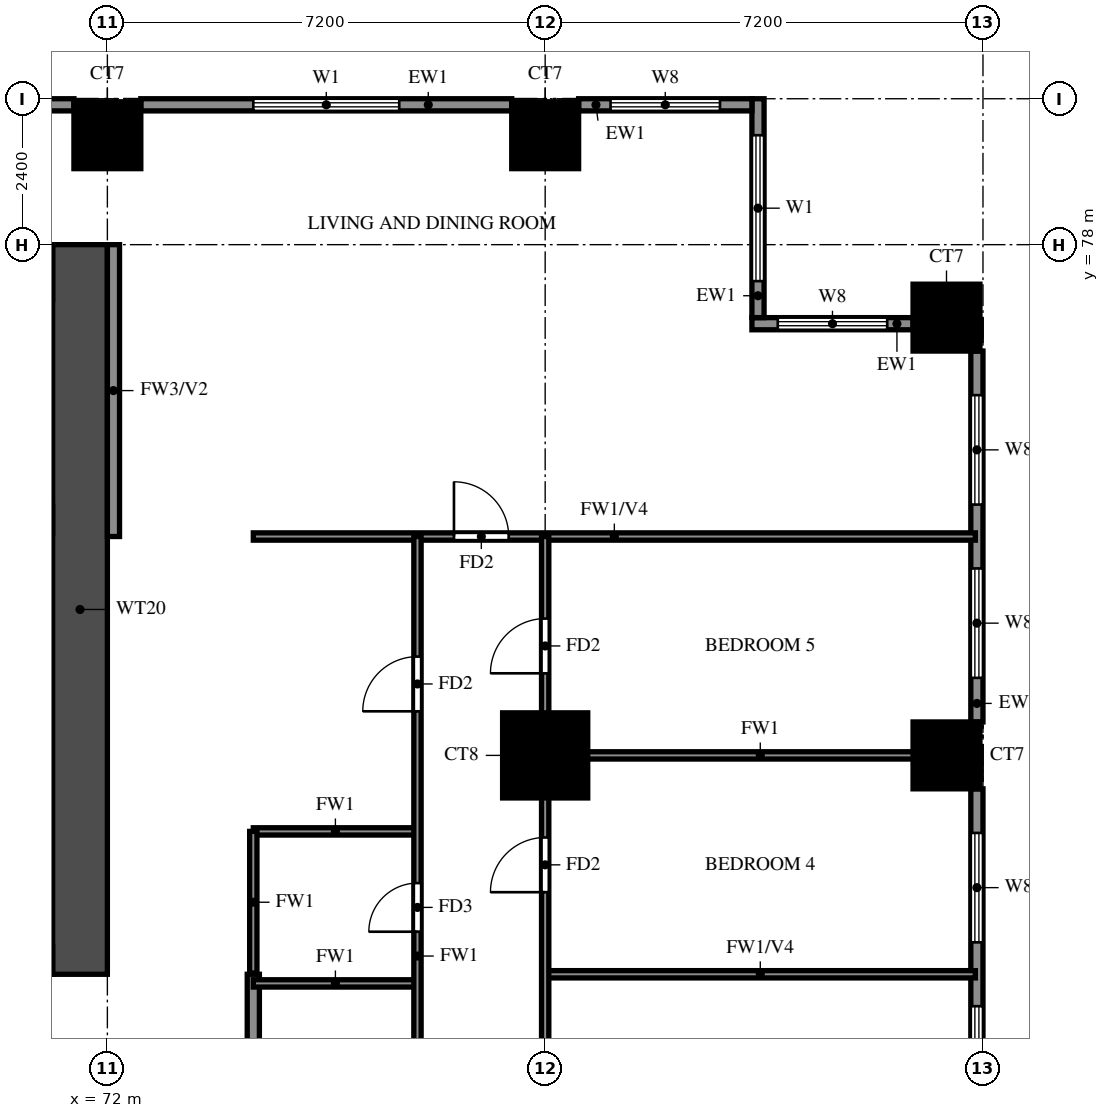
"""IFC4 building model, lengths in metres.
Left out: names, types, materials, properties, quantities, classifications, styles, units other than length and angle.
Written with IfcOpenShell. Run it as: python <this file> out.ifc"""

import sys

from ifc_helpers import new_model, si_unit, direction, frame, frame_2d, origin, origin_2d, place, context, subcontext, project, spatial, rectangle, extrude, source, transform, mapped, element, fill, save


model = new_model("IFC4")
c1 = context("Model", 3, precision=1e-05, world=origin(), true_north=direction((0.0, 1.0)))
c2 = subcontext(c1, "Body", "Model", "MODEL_VIEW")
j1 = project(units=[si_unit("LENGTHUNIT", "METRE"), si_unit("PLANEANGLEUNIT", "RADIAN")], contexts=[c1])
p1 = place(None, origin())
s1 = spatial("IfcSite", under=j1, at=p1, CompositionType="ELEMENT")
p2 = place(p1, origin())
s2 = spatial("IfcBuilding", under=s1, at=p2, CompositionType="ELEMENT")
p3 = place(p2, frame((0.0, 0.0, 30.5)))
s3 = spatial("IfcBuildingStorey", under=s2, at=p3, CompositionType="ELEMENT", Elevation=30.5)
m1 = source(origin(), c2, "Body", "SweptSolid", [
    extrude(rectangle(XDim=1.4, YDim=1.4, at=origin_2d()), origin(), (0.0, 0.0, 1.0), 3.18),
])
p4 = place(p3, frame((79.2, 69.6, 0.0), z_axis=(0.0, 0.0, 1.0), x_axis=(1.0, 0.0, 0.0)))
e1 = element("IfcColumn", 1, at=p4, inside=s3, PredefinedType="COLUMN", context=c2, shape_type="MappedRepresentation", body=[
    mapped(m1, transform((0.0, 0.0, 0.0))),
])
m2 = source(origin(), c2, "Body", "SweptSolid", [
    extrude(rectangle(XDim=1.1, YDim=1.1, at=origin_2d()), origin(), (0.0, 0.0, 1.0), 3.18),
])
for number, where, z_axis, x_axis in (
    (2, (85.8, 69.6, 0.0), (0.0, 0.0, 1.0), (1.0, 0.0, 0.0)),
    (3, (85.8, 76.8, 0.0), (0.0, 0.0, 1.0), (1.0, 0.0, 0.0)),
    (4, (72.0, 79.8, 0.0), (0.0, 0.0, 1.0), (1.0, 0.0, 0.0)),
    (5, (79.2, 79.8, 0.0), (0.0, 0.0, 1.0), (1.0, 0.0, 0.0)),
):
    element("IfcColumn", number, at=place(p3, frame(where, z_axis=z_axis, x_axis=x_axis)), inside=s3, PredefinedType="COLUMN", context=c2, shape_type="MappedRepresentation", body=[
        mapped(m2, transform((0.0, 0.0, 0.0))),
    ])
p5 = place(p3, frame((71.55, 66.0, 0.0), z_axis=(0.0, 0.0, 1.0), x_axis=(0.0, 1.0, 0.0)))
e6 = element("IfcWall", 6, at=p5, inside=s3, PredefinedType="SHEAR", context=c2, shape_type="SweptSolid", body=[
    extrude(rectangle(XDim=12.0, YDim=0.9, at=frame_2d((6.0, 0.0))), origin(), (0.0, 0.0, 1.0), 3.18),
])
p6 = place(p3, frame((29.7, 77.55, 0.0), z_axis=(0.0, 0.0, 1.0), x_axis=(1.0, 0.0, 0.0)))
e7 = element("IfcWall", 7, at=p6, inside=s3, PredefinedType="SHEAR", context=c2, shape_type="SweptSolid", body=[
    extrude(rectangle(XDim=41.4, YDim=0.9, at=frame_2d((20.7, 0.0))), origin(), (0.0, 0.0, 1.0), 3.18),
])
p7 = place(p3, frame((29.7, 66.225, 0.0), z_axis=(0.0, 0.0, 1.0), x_axis=(1.0, 0.0, 0.0)))
e8 = element("IfcWall", 8, at=p7, inside=s3, PredefinedType="SHEAR", context=c2, shape_type="SweptSolid", body=[
    extrude(rectangle(XDim=41.4, YDim=0.45, at=frame_2d((20.7, 0.0))), origin(), (0.0, 0.0, 1.0), 3.18),
])
p8 = place(p7, frame((0.925, 0.0, 0.0)))
e9 = element("IfcOpeningElement", 9, at=p8, cuts=e8, PredefinedType="OPENING", context=c2, shape_type="SweptSolid", body=[
    extrude(rectangle(XDim=1.1, YDim=2.1, at=frame_2d((0.55, 1.05))), frame((0.0, 0.235, 0.0), z_axis=(0.0, -1.0, 0.0), x_axis=(1.0, 0.0, 0.0)), (0.0, 0.0, 1.0), 0.47),
])
p9 = place(p7, frame((3.738, 0.0, 0.0)))
e10 = element("IfcOpeningElement", 10, at=p9, cuts=e8, PredefinedType="OPENING", context=c2, shape_type="SweptSolid", body=[
    extrude(rectangle(XDim=1.8, YDim=2.1, at=frame_2d((0.9, 1.05))), frame((0.0, 0.235, 0.0), z_axis=(0.0, -1.0, 0.0), x_axis=(1.0, 0.0, 0.0)), (0.0, 0.0, 1.0), 0.47),
])
p10 = place(p3, frame((86.3, 62.95, 0.0), z_axis=(0.0, 0.0, 1.0), x_axis=(0.0, 1.0, 0.0)))
e11 = element("IfcWall", 11, at=p10, inside=s3, PredefinedType="SOLIDWALL", context=c2, shape_type="SweptSolid", body=[
    extrude(rectangle(XDim=6.1, YDim=0.2, at=frame_2d((3.05, 0.0))), origin(), (0.0, 0.0, 1.0), 3.18),
])
p11 = place(p10, frame((0.725, 0.0, 0.6)))
e12 = element("IfcOpeningElement", 12, at=p11, cuts=e11, PredefinedType="OPENING", context=c2, shape_type="SweptSolid", body=[
    extrude(rectangle(XDim=1.8, YDim=2.4, at=frame_2d((0.9, 1.2))), frame((0.0, 0.11, 0.0), z_axis=(0.0, -1.0, 0.0), x_axis=(1.0, 0.0, 0.0)), (0.0, 0.0, 1.0), 0.22),
])
p12 = place(p10, frame((3.575, 0.0, 0.6)))
e13 = element("IfcOpeningElement", 13, at=p12, cuts=e11, PredefinedType="OPENING", context=c2, shape_type="SweptSolid", body=[
    extrude(rectangle(XDim=1.8, YDim=2.4, at=frame_2d((0.9, 1.2))), frame((0.0, 0.11, 0.0), z_axis=(0.0, -1.0, 0.0), x_axis=(1.0, 0.0, 0.0)), (0.0, 0.0, 1.0), 0.22),
])
p13 = place(p3, frame((86.3, 70.15, 0.0), z_axis=(0.0, 0.0, 1.0), x_axis=(0.0, 1.0, 0.0)))
e14 = element("IfcWall", 14, at=p13, inside=s3, PredefinedType="SOLIDWALL", context=c2, shape_type="SweptSolid", body=[
    extrude(rectangle(XDim=6.1, YDim=0.2, at=frame_2d((3.05, 0.0))), origin(), (0.0, 0.0, 1.0), 3.18),
])
p14 = place(p13, frame((0.725, 0.0, 0.6)))
e15 = element("IfcOpeningElement", 15, at=p14, cuts=e14, PredefinedType="OPENING", context=c2, shape_type="SweptSolid", body=[
    extrude(rectangle(XDim=1.8, YDim=2.4, at=frame_2d((0.9, 1.2))), frame((0.0, 0.11, 0.0), z_axis=(0.0, -1.0, 0.0), x_axis=(1.0, 0.0, 0.0)), (0.0, 0.0, 1.0), 0.22),
])
p15 = place(p13, frame((3.575, 0.0, 0.6)))
e16 = element("IfcOpeningElement", 16, at=p15, cuts=e14, PredefinedType="OPENING", context=c2, shape_type="SweptSolid", body=[
    extrude(rectangle(XDim=1.8, YDim=2.4, at=frame_2d((0.9, 1.2))), frame((0.0, 0.11, 0.0), z_axis=(0.0, -1.0, 0.0), x_axis=(1.0, 0.0, 0.0)), (0.0, 0.0, 1.0), 0.22),
])
p16 = place(p3, frame((85.25, 76.7, 0.0), z_axis=(0.0, 0.0, 1.0), x_axis=(-1.0, 0.0, 0.0)))
e17 = element("IfcWall", 17, at=p16, inside=s3, PredefinedType="SOLIDWALL", context=c2, shape_type="SweptSolid", body=[
    extrude(rectangle(XDim=2.65, YDim=0.2, at=frame_2d((1.325, 0.0))), origin(), (0.0, 0.0, 1.0), 3.18),
])
p17 = place(p16, frame((0.425, 0.0, 0.6)))
e18 = element("IfcOpeningElement", 18, at=p17, cuts=e17, PredefinedType="OPENING", context=c2, shape_type="SweptSolid", body=[
    extrude(rectangle(XDim=1.8, YDim=2.4, at=frame_2d((0.9, 1.2))), frame((0.0, 0.11, 0.0), z_axis=(0.0, -1.0, 0.0), x_axis=(1.0, 0.0, 0.0)), (0.0, 0.0, 1.0), 0.22),
])
p18 = place(p3, frame((82.7, 76.8, 0.0), z_axis=(0.0, 0.0, 1.0), x_axis=(0.0, 1.0, 0.0)))
e19 = element("IfcWall", 19, at=p18, inside=s3, PredefinedType="SOLIDWALL", context=c2, shape_type="SweptSolid", body=[
    extrude(rectangle(XDim=3.6, YDim=0.2, at=frame_2d((1.8, 0.0))), origin(), (0.0, 0.0, 1.0), 3.18),
])
p19 = place(p18, frame((0.6, 0.0, 0.6)))
e20 = element("IfcOpeningElement", 20, at=p19, cuts=e19, PredefinedType="OPENING", context=c2, shape_type="SweptSolid", body=[
    extrude(rectangle(XDim=2.4, YDim=2.4, at=frame_2d((1.2, 1.2))), frame((0.0, 0.11, 0.0), z_axis=(0.0, -1.0, 0.0), x_axis=(1.0, 0.0, 0.0)), (0.0, 0.0, 1.0), 0.22),
])
p20 = place(p3, frame((82.6, 80.3, 0.0), z_axis=(0.0, 0.0, 1.0), x_axis=(-1.0, 0.0, 0.0)))
e21 = element("IfcWall", 21, at=p20, inside=s3, PredefinedType="SOLIDWALL", context=c2, shape_type="SweptSolid", body=[
    extrude(rectangle(XDim=2.85, YDim=0.2, at=frame_2d((1.425, 0.0))), origin(), (0.0, 0.0, 1.0), 3.18),
])
p21 = place(p20, frame((0.525, 0.0, 0.6)))
e22 = element("IfcOpeningElement", 22, at=p21, cuts=e21, PredefinedType="OPENING", context=c2, shape_type="SweptSolid", body=[
    extrude(rectangle(XDim=1.8, YDim=2.4, at=frame_2d((0.9, 1.2))), frame((0.0, 0.11, 0.0), z_axis=(0.0, -1.0, 0.0), x_axis=(1.0, 0.0, 0.0)), (0.0, 0.0, 1.0), 0.22),
])
p22 = place(p3, frame((78.65, 80.3, 0.0), z_axis=(0.0, 0.0, 1.0), x_axis=(-1.0, 0.0, 0.0)))
e23 = element("IfcWall", 23, at=p22, inside=s3, PredefinedType="SOLIDWALL", context=c2, shape_type="SweptSolid", body=[
    extrude(rectangle(XDim=6.1, YDim=0.2, at=frame_2d((3.05, 0.0))), origin(), (0.0, 0.0, 1.0), 3.18),
])
p23 = place(p22, frame((1.85, 0.0, 0.6)))
e24 = element("IfcOpeningElement", 24, at=p23, cuts=e23, PredefinedType="OPENING", context=c2, shape_type="SweptSolid", body=[
    extrude(rectangle(XDim=2.4, YDim=2.4, at=frame_2d((1.2, 1.2))), frame((0.0, 0.11, 0.0), z_axis=(0.0, -1.0, 0.0), x_axis=(1.0, 0.0, 0.0)), (0.0, 0.0, 1.0), 0.22),
])
p24 = place(p3, frame((71.45, 80.3, 0.0), z_axis=(0.0, 0.0, 1.0), x_axis=(-1.0, 0.0, 0.0)))
e25 = element("IfcWall", 25, at=p24, inside=s3, PredefinedType="SOLIDWALL", context=c2, shape_type="SweptSolid", body=[
    extrude(rectangle(XDim=6.1, YDim=0.2, at=frame_2d((3.05, 0.0))), origin(), (0.0, 0.0, 1.0), 3.18),
])
p25 = place(p3, frame((72.1, 73.2, 0.0), z_axis=(0.0, 0.0, 1.0), x_axis=(0.0, 1.0, 0.0)))
e26 = element("IfcWall", 26, at=p25, inside=s3, PredefinedType="SOLIDWALL", context=c2, shape_type="SweptSolid", body=[
    extrude(rectangle(XDim=4.8, YDim=0.2, at=frame_2d((2.4, 0.0))), origin(), (0.0, 0.0, 1.0), 3.18),
])
p26 = place(p3, frame((74.4, 56.4, 0.0), z_axis=(0.0, 0.0, 1.0), x_axis=(0.0, 1.0, 0.0)))
e27 = element("IfcWall", 27, at=p26, inside=s3, PredefinedType="SOLIDWALL", context=c2, shape_type="SweptSolid", body=[
    extrude(rectangle(XDim=9.6, YDim=0.2, at=frame_2d((4.8, 0.0))), origin(), (0.0, 0.0, 1.0), 3.18),
])
p27 = place(p26, frame((0.7, 0.0, 0.0)))
e28 = element("IfcOpeningElement", 28, at=p27, cuts=e27, PredefinedType="OPENING", context=c2, shape_type="SweptSolid", body=[
    extrude(rectangle(XDim=1.0, YDim=2.1, at=frame_2d((0.5, 1.05))), frame((0.0, 0.11, 0.0), z_axis=(0.0, -1.0, 0.0), x_axis=(1.0, 0.0, 0.0)), (0.0, 0.0, 1.0), 0.22),
])
p28 = place(p26, frame((3.1, 0.0, 0.0)))
e29 = element("IfcOpeningElement", 29, at=p28, cuts=e27, PredefinedType="OPENING", context=c2, shape_type="SweptSolid", body=[
    extrude(rectangle(XDim=1.0, YDim=2.1, at=frame_2d((0.5, 1.05))), frame((0.0, 0.11, 0.0), z_axis=(0.0, -1.0, 0.0), x_axis=(1.0, 0.0, 0.0)), (0.0, 0.0, 1.0), 0.22),
])
p29 = place(p3, frame((74.4, 65.85, 0.0), z_axis=(0.0, 0.0, 1.0), x_axis=(1.0, 0.0, 0.0)))
e30 = element("IfcWall", 30, at=p29, inside=s3, PredefinedType="PARTITIONING", context=c2, shape_type="SweptSolid", body=[
    extrude(rectangle(XDim=2.7, YDim=0.12, at=frame_2d((1.35, 0.0))), origin(), (0.0, 0.0, 1.0), 3.18),
])
p30 = place(p3, frame((79.2, 66.0, 0.0), z_axis=(0.0, 0.0, 1.0), x_axis=(1.0, 0.0, 0.0)))
e31 = element("IfcWall", 31, at=p30, inside=s3, PredefinedType="PARTITIONING", context=c2, shape_type="SweptSolid", body=[
    extrude(rectangle(XDim=7.075, YDim=0.12, at=frame_2d((3.538, 0.0))), origin(), (0.0, 0.0, 1.0), 2.28),
])
p31 = place(p3, frame((74.4, 68.35, 0.0), z_axis=(0.0, 0.0, 1.0), x_axis=(1.0, 0.0, 0.0)))
e32 = element("IfcWall", 32, at=p31, inside=s3, PredefinedType="PARTITIONING", context=c2, shape_type="SweptSolid", body=[
    extrude(rectangle(XDim=2.7, YDim=0.12, at=frame_2d((1.35, 0.0))), origin(), (0.0, 0.0, 1.0), 3.18),
])
p32 = place(p3, frame((79.2, 69.6, 0.0), z_axis=(0.0, 0.0, 1.0), x_axis=(1.0, 0.0, 0.0)))
e33 = element("IfcWall", 33, at=p32, inside=s3, PredefinedType="PARTITIONING", context=c2, shape_type="SweptSolid", body=[
    extrude(rectangle(XDim=7.075, YDim=0.12, at=frame_2d((3.538, 0.0))), origin(), (0.0, 0.0, 1.0), 3.18),
])
p33 = place(p3, frame((74.4, 73.2, 0.0), z_axis=(0.0, 0.0, 1.0), x_axis=(1.0, 0.0, 0.0)))
e34 = element("IfcWall", 34, at=p33, inside=s3, PredefinedType="PARTITIONING", context=c2, shape_type="SweptSolid", body=[
    extrude(rectangle(XDim=11.875, YDim=0.12, at=frame_2d((5.938, 0.0))), origin(), (0.0, 0.0, 1.0), 2.28),
])
p34 = place(p33, frame((3.3, 0.0, 0.0)))
e35 = element("IfcOpeningElement", 35, at=p34, cuts=e34, PredefinedType="OPENING", context=c2, shape_type="SweptSolid", body=[
    extrude(rectangle(XDim=0.9, YDim=2.1, at=frame_2d((0.45, 1.05))), frame((0.0, 0.07, 0.0), z_axis=(0.0, -1.0, 0.0), x_axis=(1.0, 0.0, 0.0)), (0.0, 0.0, 1.0), 0.14),
])
p35 = place(p3, frame((74.4, 66.02, 0.0), z_axis=(0.0, 0.0, 1.0), x_axis=(0.0, 1.0, 0.0)))
e36 = element("IfcWall", 36, at=p35, inside=s3, PredefinedType="PARTITIONING", context=c2, shape_type="SweptSolid", body=[
    extrude(rectangle(XDim=2.33, YDim=0.12, at=frame_2d((1.165, 0.0))), origin(), (0.0, 0.0, 1.0), 3.18),
])
p36 = place(p3, frame((77.1, 61.2, 0.0), z_axis=(0.0, 0.0, 1.0), x_axis=(0.0, 1.0, 0.0)))
e37 = element("IfcWall", 37, at=p36, inside=s3, PredefinedType="PARTITIONING", context=c2, shape_type="SweptSolid", body=[
    extrude(rectangle(XDim=12.0, YDim=0.12, at=frame_2d((6.0, 0.0))), origin(), (0.0, 0.0, 1.0), 3.18),
])
p37 = place(p36, frame((1.875, 0.0, 0.0)))
e38 = element("IfcOpeningElement", 38, at=p37, cuts=e37, PredefinedType="OPENING", context=c2, shape_type="SweptSolid", body=[
    extrude(rectangle(XDim=0.9, YDim=2.1, at=frame_2d((0.45, 1.05))), frame((0.0, 0.07, 0.0), z_axis=(0.0, -1.0, 0.0), x_axis=(1.0, 0.0, 0.0)), (0.0, 0.0, 1.0), 0.14),
])
p38 = place(p36, frame((5.5, 0.0, 0.0)))
e39 = element("IfcOpeningElement", 39, at=p38, cuts=e37, PredefinedType="OPENING", context=c2, shape_type="SweptSolid", body=[
    extrude(rectangle(XDim=0.8, YDim=2.1, at=frame_2d((0.4, 1.05))), frame((0.0, 0.07, 0.0), z_axis=(0.0, -1.0, 0.0), x_axis=(1.0, 0.0, 0.0)), (0.0, 0.0, 1.0), 0.14),
])
p39 = place(p36, frame((9.125, 0.0, 0.0)))
e40 = element("IfcOpeningElement", 40, at=p39, cuts=e37, PredefinedType="OPENING", context=c2, shape_type="SweptSolid", body=[
    extrude(rectangle(XDim=0.9, YDim=2.1, at=frame_2d((0.45, 1.05))), frame((0.0, 0.07, 0.0), z_axis=(0.0, -1.0, 0.0), x_axis=(1.0, 0.0, 0.0)), (0.0, 0.0, 1.0), 0.14),
])
p40 = place(p3, frame((79.2, 55.2, 0.0), z_axis=(0.0, 0.0, 1.0), x_axis=(0.0, 1.0, 0.0)))
e41 = element("IfcWall", 41, at=p40, inside=s3, PredefinedType="PARTITIONING", context=c2, shape_type="SweptSolid", body=[
    extrude(rectangle(XDim=18.0, YDim=0.12, at=frame_2d((9.0, 0.0))), origin(), (0.0, 0.0, 1.0), 3.18),
])
p41 = place(p40, frame((1.05, 0.0, 0.0)))
e42 = element("IfcOpeningElement", 42, at=p41, cuts=e41, PredefinedType="OPENING", context=c2, shape_type="SweptSolid", body=[
    extrude(rectangle(XDim=1.5, YDim=2.1, at=frame_2d((0.75, 1.05))), frame((0.0, 0.07, 0.0), z_axis=(0.0, -1.0, 0.0), x_axis=(1.0, 0.0, 0.0)), (0.0, 0.0, 1.0), 0.14),
])
p42 = place(p40, frame((4.95, 0.0, 0.0)))
e43 = element("IfcOpeningElement", 43, at=p42, cuts=e41, PredefinedType="OPENING", context=c2, shape_type="SweptSolid", body=[
    extrude(rectangle(XDim=0.9, YDim=2.1, at=frame_2d((0.45, 1.05))), frame((0.0, 0.07, 0.0), z_axis=(0.0, -1.0, 0.0), x_axis=(1.0, 0.0, 0.0)), (0.0, 0.0, 1.0), 0.14),
])
p43 = place(p40, frame((8.55, 0.0, 0.0)))
e44 = element("IfcOpeningElement", 44, at=p43, cuts=e41, PredefinedType="OPENING", context=c2, shape_type="SweptSolid", body=[
    extrude(rectangle(XDim=0.9, YDim=2.1, at=frame_2d((0.45, 1.05))), frame((0.0, 0.07, 0.0), z_axis=(0.0, -1.0, 0.0), x_axis=(1.0, 0.0, 0.0)), (0.0, 0.0, 1.0), 0.14),
])
p44 = place(p40, frame((12.15, 0.0, 0.0)))
e45 = element("IfcOpeningElement", 45, at=p44, cuts=e41, PredefinedType="OPENING", context=c2, shape_type="SweptSolid", body=[
    extrude(rectangle(XDim=0.9, YDim=2.1, at=frame_2d((0.45, 1.05))), frame((0.0, 0.07, 0.0), z_axis=(0.0, -1.0, 0.0), x_axis=(1.0, 0.0, 0.0)), (0.0, 0.0, 1.0), 0.14),
])
p45 = place(p40, frame((15.75, 0.0, 0.0)))
e46 = element("IfcOpeningElement", 46, at=p45, cuts=e41, PredefinedType="OPENING", context=c2, shape_type="SweptSolid", body=[
    extrude(rectangle(XDim=0.9, YDim=2.1, at=frame_2d((0.45, 1.05))), frame((0.0, 0.07, 0.0), z_axis=(0.0, -1.0, 0.0), x_axis=(1.0, 0.0, 0.0)), (0.0, 0.0, 1.0), 0.14),
])
p46 = place(p11, origin())
e47 = element("IfcWindow", 47, at=p46, inside=s3, PartitioningType="DOUBLE_PANEL_VERTICAL", PredefinedType="WINDOW", context=c2, shape_type="SweptSolid", body=[
    extrude(rectangle(XDim=1.8, YDim=2.4, at=frame_2d((0.9, 1.2))), frame((0.0, 0.03, 0.0), z_axis=(0.0, -1.0, 0.0), x_axis=(1.0, 0.0, 0.0)), (0.0, 0.0, 1.0), 0.06),
])
fill(e12, e47)
p47 = place(p12, origin())
e48 = element("IfcWindow", 48, at=p47, inside=s3, PartitioningType="DOUBLE_PANEL_VERTICAL", PredefinedType="WINDOW", context=c2, shape_type="SweptSolid", body=[
    extrude(rectangle(XDim=1.8, YDim=2.4, at=frame_2d((0.9, 1.2))), frame((0.0, 0.03, 0.0), z_axis=(0.0, -1.0, 0.0), x_axis=(1.0, 0.0, 0.0)), (0.0, 0.0, 1.0), 0.06),
])
fill(e13, e48)
p48 = place(p14, origin())
e49 = element("IfcWindow", 49, at=p48, inside=s3, PartitioningType="DOUBLE_PANEL_VERTICAL", PredefinedType="WINDOW", context=c2, shape_type="SweptSolid", body=[
    extrude(rectangle(XDim=1.8, YDim=2.4, at=frame_2d((0.9, 1.2))), frame((0.0, 0.03, 0.0), z_axis=(0.0, -1.0, 0.0), x_axis=(1.0, 0.0, 0.0)), (0.0, 0.0, 1.0), 0.06),
])
fill(e15, e49)
p49 = place(p15, origin())
e50 = element("IfcWindow", 50, at=p49, inside=s3, PartitioningType="DOUBLE_PANEL_VERTICAL", PredefinedType="WINDOW", context=c2, shape_type="SweptSolid", body=[
    extrude(rectangle(XDim=1.8, YDim=2.4, at=frame_2d((0.9, 1.2))), frame((0.0, 0.03, 0.0), z_axis=(0.0, -1.0, 0.0), x_axis=(1.0, 0.0, 0.0)), (0.0, 0.0, 1.0), 0.06),
])
fill(e16, e50)
p50 = place(p17, origin())
e51 = element("IfcWindow", 51, at=p50, inside=s3, PartitioningType="DOUBLE_PANEL_VERTICAL", PredefinedType="WINDOW", context=c2, shape_type="SweptSolid", body=[
    extrude(rectangle(XDim=1.8, YDim=2.4, at=frame_2d((0.9, 1.2))), frame((0.0, 0.03, 0.0), z_axis=(0.0, -1.0, 0.0), x_axis=(1.0, 0.0, 0.0)), (0.0, 0.0, 1.0), 0.06),
])
fill(e18, e51)
p51 = place(p19, origin())
e52 = element("IfcWindow", 52, at=p51, inside=s3, PartitioningType="DOUBLE_PANEL_VERTICAL", PredefinedType="WINDOW", context=c2, shape_type="SweptSolid", body=[
    extrude(rectangle(XDim=2.4, YDim=2.4, at=frame_2d((1.2, 1.2))), frame((0.0, 0.03, 0.0), z_axis=(0.0, -1.0, 0.0), x_axis=(1.0, 0.0, 0.0)), (0.0, 0.0, 1.0), 0.06),
])
fill(e20, e52)
p52 = place(p21, origin())
e53 = element("IfcWindow", 53, at=p52, inside=s3, PartitioningType="DOUBLE_PANEL_VERTICAL", PredefinedType="WINDOW", context=c2, shape_type="SweptSolid", body=[
    extrude(rectangle(XDim=1.8, YDim=2.4, at=frame_2d((0.9, 1.2))), frame((0.0, 0.03, 0.0), z_axis=(0.0, -1.0, 0.0), x_axis=(1.0, 0.0, 0.0)), (0.0, 0.0, 1.0), 0.06),
])
fill(e22, e53)
p53 = place(p23, origin())
e54 = element("IfcWindow", 54, at=p53, inside=s3, PartitioningType="DOUBLE_PANEL_VERTICAL", PredefinedType="WINDOW", context=c2, shape_type="SweptSolid", body=[
    extrude(rectangle(XDim=2.4, YDim=2.4, at=frame_2d((1.2, 1.2))), frame((0.0, 0.03, 0.0), z_axis=(0.0, -1.0, 0.0), x_axis=(1.0, 0.0, 0.0)), (0.0, 0.0, 1.0), 0.06),
])
fill(e24, e54)
p54 = place(p44, origin())
e55 = element("IfcDoor", 55, at=p54, inside=s3, OperationType="SINGLE_SWING_LEFT", PredefinedType="DOOR", context=c2, shape_type="SweptSolid", body=[
    extrude(rectangle(XDim=0.9, YDim=2.1, at=frame_2d((0.45, 1.05))), frame((0.0, 0.025, 0.0), z_axis=(0.0, -1.0, 0.0), x_axis=(1.0, 0.0, 0.0)), (0.0, 0.0, 1.0), 0.05),
])
fill(e45, e55)
p55 = place(p45, origin())
e56 = element("IfcDoor", 56, at=p55, inside=s3, OperationType="SINGLE_SWING_LEFT", PredefinedType="DOOR", context=c2, shape_type="SweptSolid", body=[
    extrude(rectangle(XDim=0.9, YDim=2.1, at=frame_2d((0.45, 1.05))), frame((0.0, 0.025, 0.0), z_axis=(0.0, -1.0, 0.0), x_axis=(1.0, 0.0, 0.0)), (0.0, 0.0, 1.0), 0.05),
])
fill(e46, e56)
p56 = place(p34, origin())
e57 = element("IfcDoor", 57, at=p56, inside=s3, OperationType="SINGLE_SWING_RIGHT", PredefinedType="DOOR", context=c2, shape_type="SweptSolid", body=[
    extrude(rectangle(XDim=0.9, YDim=2.1, at=frame_2d((0.45, 1.05))), frame((0.0, 0.025, 0.0), z_axis=(0.0, -1.0, 0.0), x_axis=(1.0, 0.0, 0.0)), (0.0, 0.0, 1.0), 0.05),
])
fill(e35, e57)
p57 = place(p38, origin())
e58 = element("IfcDoor", 58, at=p57, inside=s3, OperationType="SINGLE_SWING_LEFT", PredefinedType="DOOR", context=c2, shape_type="SweptSolid", body=[
    extrude(rectangle(XDim=0.8, YDim=2.1, at=frame_2d((0.4, 1.05))), frame((0.0, 0.025, 0.0), z_axis=(0.0, -1.0, 0.0), x_axis=(1.0, 0.0, 0.0)), (0.0, 0.0, 1.0), 0.05),
])
fill(e39, e58)
p58 = place(p39, origin())
e59 = element("IfcDoor", 59, at=p58, inside=s3, OperationType="SINGLE_SWING_RIGHT", PredefinedType="DOOR", context=c2, shape_type="SweptSolid", body=[
    extrude(rectangle(XDim=0.9, YDim=2.1, at=frame_2d((0.45, 1.05))), frame((0.0, 0.025, 0.0), z_axis=(0.0, -1.0, 0.0), x_axis=(1.0, 0.0, 0.0)), (0.0, 0.0, 1.0), 0.05),
])
fill(e40, e59)
save(model, sys.argv[1])
